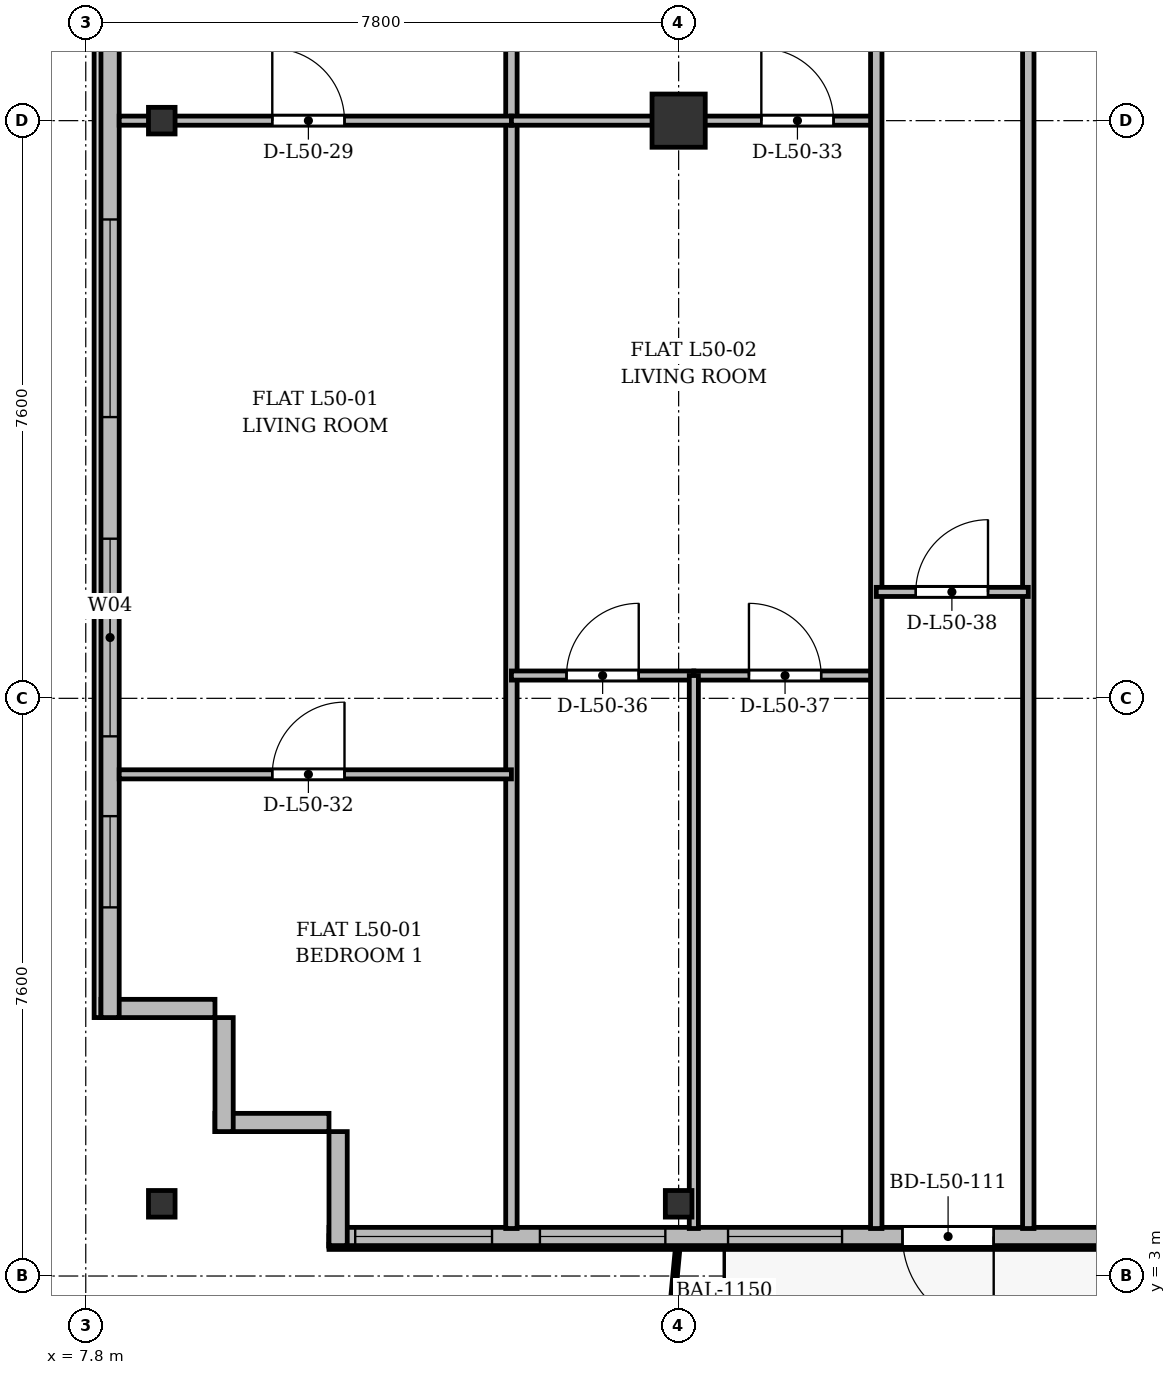
"""IFC4 building model, lengths in metres.
Left out: names, types, materials, properties, quantities, classifications, styles, units other than length and angle.
Written with IfcOpenShell. Run it as: python <this file> out.ifc"""

import sys

from ifc_helpers import new_model, si_unit, direction, frame, frame_2d, origin, origin_2d, place, context, subcontext, project, spatial, rectangle, i_section, extrude, source, transform, mapped, element, fill, save


model = new_model("IFC4")
c1 = context("Model", 3, precision=1e-05, world=origin(), true_north=direction((0.0, 1.0)))
c2 = subcontext(c1, "Body", "Model", "MODEL_VIEW")
j1 = project(units=[si_unit("LENGTHUNIT", "METRE"), si_unit("PLANEANGLEUNIT", "RADIAN")], contexts=[c1])
p1 = place(None, origin())
s1 = spatial("IfcSite", under=j1, at=p1, CompositionType="ELEMENT")
p2 = place(p1, origin())
s2 = spatial("IfcBuilding", under=s1, at=p2, CompositionType="ELEMENT")
p3 = place(p2, frame((0.0, 0.0, 194.1)))
s3 = spatial("IfcBuildingStorey", under=s2, at=p3, CompositionType="ELEMENT", Elevation=194.1)
m1 = source(origin(), c2, "Body", "SweptSolid", [
    extrude(i_section(OverallWidth=0.35, OverallDepth=0.35, WebThickness=0.018, FlangeThickness=0.028, at=origin_2d()), origin(), (0.0, 0.0, 1.0), 3.6),
])
for number, where, z_axis, x_axis in (
    (1, (8.8, 3.95, 0.0), (0.0, 0.0, 1.0), (1.0, 0.0, 0.0)),
    (2, (8.8, 18.2, 0.0), (0.0, 0.0, 1.0), (1.0, 0.0, 0.0)),
    (3, (15.6, 3.95, 0.0), (0.0, 0.0, 1.0), (1.0, 0.0, 0.0)),
):
    element("IfcColumn", number, at=place(p3, frame(where, z_axis=z_axis, x_axis=x_axis)), inside=s3, PredefinedType="COLUMN", context=c2, shape_type="MappedRepresentation", body=[
        mapped(m1, transform((0.0, 0.0, 0.0), x_axis=(1.0, 0.0, 0.0), y_axis=(0.0, 1.0, 0.0), z_axis=(0.0, 0.0, 1.0), scale=1.0)),
    ])
m2 = source(origin(), c2, "Body", "SweptSolid", [
    extrude(rectangle(XDim=0.7, YDim=0.7, at=origin_2d()), origin(), (0.0, 0.0, 1.0), 3.6),
])
p4 = place(p3, frame((15.6, 18.2, 0.0), z_axis=(0.0, 0.0, 1.0), x_axis=(1.0, 0.0, 0.0)))
e4 = element("IfcColumn", 4, at=p4, inside=s3, PredefinedType="COLUMN", context=c2, shape_type="MappedRepresentation", body=[
    mapped(m2, transform((0.0, 0.0, 0.0), x_axis=(1.0, 0.0, 0.0), y_axis=(0.0, 1.0, 0.0), z_axis=(0.0, 0.0, 1.0), scale=1.0)),
])
for number, where, z_axis, x_axis in (
    (5, (11.0, 5.02, 0.0), (0.0, 0.0, 1.0), (-1.0, 0.0, 0.0)),
    (6, (9.62, 4.9, 0.0), (0.0, 0.0, 1.0), (0.0, 1.0, 0.0)),
):
    element("IfcWall", number, at=place(p3, frame(where, z_axis=z_axis, x_axis=x_axis)), inside=s3, PredefinedType="SOLIDWALL", context=c2, shape_type="SweptSolid", body=[
        extrude(rectangle(XDim=1.5, YDim=0.24, at=frame_2d((0.75, 0.0))), origin(), (0.0, 0.0, 1.0), 3.36),
    ])
p5 = place(p3, frame((9.5, 6.52, 0.0), z_axis=(0.0, 0.0, 1.0), x_axis=(-1.0, 0.0, 0.0)))
e7 = element("IfcWall", 7, at=p5, inside=s3, PredefinedType="SOLIDWALL", context=c2, shape_type="SweptSolid", body=[
    extrude(rectangle(XDim=1.5, YDim=0.24, at=frame_2d((0.75, 0.0))), origin(), (0.0, 0.0, 1.0), 2.86),
])
p6 = place(p3, frame((8.12, 6.4, 0.0), z_axis=(0.0, 0.0, 1.0), x_axis=(0.0, 1.0, 0.0)))
e8 = element("IfcWall", 8, at=p6, inside=s3, PredefinedType="SOLIDWALL", context=c2, shape_type="SweptSolid", body=[
    extrude(rectangle(XDim=39.1, YDim=0.24, at=frame_2d((19.55, 0.0))), origin(), (0.0, 0.0, 1.0), 3.36),
])
p7 = place(p6, frame((1.45, 0.0, 0.92)))
e9 = element("IfcOpeningElement", 9, at=p7, cuts=e8, PredefinedType="OPENING", context=c2, shape_type="SweptSolid", body=[
    extrude(rectangle(XDim=1.2, YDim=1.65, at=frame_2d((0.6, 0.825))), frame((0.0, 0.13, 0.0), z_axis=(0.0, -1.0, 0.0), x_axis=(1.0, 0.0, 0.0)), (0.0, 0.0, 1.0), 0.26),
])
p8 = place(p6, frame((3.7, 0.0, 0.92)))
e10 = element("IfcOpeningElement", 10, at=p8, cuts=e8, PredefinedType="OPENING", context=c2, shape_type="SweptSolid", body=[
    extrude(rectangle(XDim=2.6, YDim=1.9, at=frame_2d((1.3, 0.95))), frame((0.0, 0.13, 0.0), z_axis=(0.0, -1.0, 0.0), x_axis=(1.0, 0.0, 0.0)), (0.0, 0.0, 1.0), 0.26),
])
p9 = place(p6, frame((7.9, 0.0, 0.92)))
e11 = element("IfcOpeningElement", 11, at=p9, cuts=e8, PredefinedType="OPENING", context=c2, shape_type="SweptSolid", body=[
    extrude(rectangle(XDim=2.6, YDim=1.9, at=frame_2d((1.3, 0.95))), frame((0.0, 0.13, 0.0), z_axis=(0.0, -1.0, 0.0), x_axis=(1.0, 0.0, 0.0)), (0.0, 0.0, 1.0), 0.26),
])
p10 = place(p6, frame((15.1, 0.0, 0.92)))
e12 = element("IfcOpeningElement", 12, at=p10, cuts=e8, PredefinedType="OPENING", context=c2, shape_type="SweptSolid", body=[
    extrude(rectangle(XDim=2.6, YDim=1.9, at=frame_2d((1.3, 0.95))), frame((0.0, 0.13, 0.0), z_axis=(0.0, -1.0, 0.0), x_axis=(1.0, 0.0, 0.0)), (0.0, 0.0, 1.0), 0.26),
])
p11 = place(p6, frame((33.4, 0.0, 0.92)))
e13 = element("IfcOpeningElement", 13, at=p11, cuts=e8, PredefinedType="OPENING", context=c2, shape_type="SweptSolid", body=[
    extrude(rectangle(XDim=1.2, YDim=1.65, at=frame_2d((0.6, 0.825))), frame((0.0, 0.13, 0.0), z_axis=(0.0, -1.0, 0.0), x_axis=(1.0, 0.0, 0.0)), (0.0, 0.0, 1.0), 0.26),
])
p12 = place(p6, frame((36.75, 0.0, 0.92)))
e14 = element("IfcOpeningElement", 14, at=p12, cuts=e8, PredefinedType="OPENING", context=c2, shape_type="SweptSolid", body=[
    extrude(rectangle(XDim=1.2, YDim=1.65, at=frame_2d((0.6, 0.825))), frame((0.0, 0.13, 0.0), z_axis=(0.0, -1.0, 0.0), x_axis=(1.0, 0.0, 0.0)), (0.0, 0.0, 1.0), 0.26),
])
p13 = place(p3, frame((30.6, 3.52, 0.0), z_axis=(0.0, 0.0, 1.0), x_axis=(-1.0, 0.0, 0.0)))
e15 = element("IfcWall", 15, at=p13, inside=s3, PredefinedType="SOLIDWALL", context=c2, shape_type="SweptSolid", body=[
    extrude(rectangle(XDim=19.6, YDim=0.24, at=frame_2d((9.8, 0.0))), origin(), (0.0, 0.0, 1.0), 3.36),
])
p14 = place(p13, frame((1.745, 0.0, 0.9)))
e16 = element("IfcOpeningElement", 16, at=p14, cuts=e15, PredefinedType="OPENING", context=c2, shape_type="SweptSolid", body=[
    extrude(rectangle(XDim=1.8, YDim=1.8, at=frame_2d((0.9, 0.9))), frame((0.0, 0.13, 0.0), z_axis=(0.0, -1.0, 0.0), x_axis=(1.0, 0.0, 0.0)), (0.0, 0.0, 1.0), 0.26),
])
p15 = place(p13, frame((6.7, 0.0, 0.9)))
e17 = element("IfcOpeningElement", 17, at=p15, cuts=e15, PredefinedType="OPENING", context=c2, shape_type="SweptSolid", body=[
    extrude(rectangle(XDim=2.2, YDim=1.8, at=frame_2d((1.1, 0.9))), frame((0.0, 0.13, 0.0), z_axis=(0.0, -1.0, 0.0), x_axis=(1.0, 0.0, 0.0)), (0.0, 0.0, 1.0), 0.26),
])
p16 = place(p13, frame((10.855, 0.0, 0.0)))
e18 = element("IfcOpeningElement", 18, at=p16, cuts=e15, PredefinedType="OPENING", context=c2, shape_type="SweptSolid", body=[
    extrude(rectangle(XDim=1.2, YDim=2.2, at=frame_2d((0.6, 1.1))), frame((0.0, 0.13, 0.0), z_axis=(0.0, -1.0, 0.0), x_axis=(1.0, 0.0, 0.0)), (0.0, 0.0, 1.0), 0.26),
])
p17 = place(p13, frame((12.85, 0.0, 0.9)))
e19 = element("IfcOpeningElement", 19, at=p17, cuts=e15, PredefinedType="OPENING", context=c2, shape_type="SweptSolid", body=[
    extrude(rectangle(XDim=1.5, YDim=1.75, at=frame_2d((0.75, 0.875))), frame((0.0, 0.13, 0.0), z_axis=(0.0, -1.0, 0.0), x_axis=(1.0, 0.0, 0.0)), (0.0, 0.0, 1.0), 0.26),
])
p18 = place(p13, frame((15.175, 0.0, 0.9)))
e20 = element("IfcOpeningElement", 20, at=p18, cuts=e15, PredefinedType="OPENING", context=c2, shape_type="SweptSolid", body=[
    extrude(rectangle(XDim=1.65, YDim=1.85, at=frame_2d((0.825, 0.925))), frame((0.0, 0.13, 0.0), z_axis=(0.0, -1.0, 0.0), x_axis=(1.0, 0.0, 0.0)), (0.0, 0.0, 1.0), 0.26),
])
p19 = place(p13, frame((17.455, 0.0, 0.9)))
e21 = element("IfcOpeningElement", 21, at=p19, cuts=e15, PredefinedType="OPENING", context=c2, shape_type="SweptSolid", body=[
    extrude(rectangle(XDim=1.8, YDim=1.8, at=frame_2d((0.9, 0.9))), frame((0.0, 0.13, 0.0), z_axis=(0.0, -1.0, 0.0), x_axis=(1.0, 0.0, 0.0)), (0.0, 0.0, 1.0), 0.26),
])
p20 = place(p3, frame((11.12, 3.4, 0.0), z_axis=(0.0, 0.0, 1.0), x_axis=(0.0, 1.0, 0.0)))
e22 = element("IfcWall", 22, at=p20, inside=s3, PredefinedType="SOLIDWALL", context=c2, shape_type="SweptSolid", body=[
    extrude(rectangle(XDim=1.5, YDim=0.24, at=frame_2d((0.75, 0.0))), origin(), (0.0, 0.0, 1.0), 2.91),
])
p21 = place(p3, frame((13.4, 3.625, 0.0), z_axis=(0.0, 0.0, 1.0), x_axis=(0.0, 1.0, 0.0)))
e23 = element("IfcWall", 23, at=p21, inside=s3, PredefinedType="PARTITIONING", context=c2, shape_type="SweptSolid", body=[
    extrude(rectangle(XDim=27.175, YDim=0.15, at=frame_2d((13.587, 0.0))), origin(), (0.0, 0.0, 1.0), 2.91),
])
p22 = place(p3, frame((8.24, 18.2, 0.0), z_axis=(0.0, 0.0, 1.0), x_axis=(1.0, 0.0, 0.0)))
e24 = element("IfcWall", 24, at=p22, inside=s3, PredefinedType="PARTITIONING", context=c2, shape_type="SweptSolid", body=[
    extrude(rectangle(XDim=5.16, YDim=0.12, at=frame_2d((2.58, 0.0))), origin(), (0.0, 0.0, 1.0), 2.91),
])
p23 = place(p22, frame((2.014, 0.0, 0.0)))
e25 = element("IfcOpeningElement", 25, at=p23, cuts=e24, PredefinedType="OPENING", context=c2, shape_type="SweptSolid", body=[
    extrude(rectangle(XDim=0.95, YDim=2.15, at=frame_2d((0.475, 1.075))), frame((0.0, 0.07, 0.0), z_axis=(0.0, -1.0, 0.0), x_axis=(1.0, 0.0, 0.0)), (0.0, 0.0, 1.0), 0.14),
])
p24 = place(p3, frame((8.24, 9.6, 0.0), z_axis=(0.0, 0.0, 1.0), x_axis=(1.0, 0.0, 0.0)))
e26 = element("IfcWall", 26, at=p24, inside=s3, PredefinedType="PARTITIONING", context=c2, shape_type="SweptSolid", body=[
    extrude(rectangle(XDim=5.16, YDim=0.12, at=frame_2d((2.58, 0.0))), origin(), (0.0, 0.0, 1.0), 2.86),
])
p25 = place(p24, frame((2.014, 0.0, 0.0)))
e27 = element("IfcOpeningElement", 27, at=p25, cuts=e26, PredefinedType="OPENING", context=c2, shape_type="SweptSolid", body=[
    extrude(rectangle(XDim=0.95, YDim=2.15, at=frame_2d((0.475, 1.075))), frame((0.0, 0.07, 0.0), z_axis=(0.0, -1.0, 0.0), x_axis=(1.0, 0.0, 0.0)), (0.0, 0.0, 1.0), 0.14),
])
p26 = place(p3, frame((13.4, 18.2, 0.0), z_axis=(0.0, 0.0, 1.0), x_axis=(1.0, 0.0, 0.0)))
e28 = element("IfcWall", 28, at=p26, inside=s3, PredefinedType="PARTITIONING", context=c2, shape_type="SweptSolid", body=[
    extrude(rectangle(XDim=4.8, YDim=0.12, at=frame_2d((2.4, 0.0))), origin(), (0.0, 0.0, 1.0), 2.91),
])
p27 = place(p26, frame((3.288, 0.0, 0.0)))
e29 = element("IfcOpeningElement", 29, at=p27, cuts=e28, PredefinedType="OPENING", context=c2, shape_type="SweptSolid", body=[
    extrude(rectangle(XDim=0.95, YDim=2.15, at=frame_2d((0.475, 1.075))), frame((0.0, 0.07, 0.0), z_axis=(0.0, -1.0, 0.0), x_axis=(1.0, 0.0, 0.0)), (0.0, 0.0, 1.0), 0.14),
])
p28 = place(p3, frame((13.4, 10.9, 0.0), z_axis=(0.0, 0.0, 1.0), x_axis=(1.0, 0.0, 0.0)))
e30 = element("IfcWall", 30, at=p28, inside=s3, PredefinedType="PARTITIONING", context=c2, shape_type="SweptSolid", body=[
    extrude(rectangle(XDim=2.4, YDim=0.12, at=frame_2d((1.2, 0.0))), origin(), (0.0, 0.0, 1.0), 2.86),
])
p29 = place(p28, frame((0.725, 0.0, 0.0)))
e31 = element("IfcOpeningElement", 31, at=p29, cuts=e30, PredefinedType="OPENING", context=c2, shape_type="SweptSolid", body=[
    extrude(rectangle(XDim=0.95, YDim=2.15, at=frame_2d((0.475, 1.075))), frame((0.0, 0.07, 0.0), z_axis=(0.0, -1.0, 0.0), x_axis=(1.0, 0.0, 0.0)), (0.0, 0.0, 1.0), 0.14),
])
p30 = place(p3, frame((15.8, 10.9, 0.0), z_axis=(0.0, 0.0, 1.0), x_axis=(1.0, 0.0, 0.0)))
e32 = element("IfcWall", 32, at=p30, inside=s3, PredefinedType="PARTITIONING", context=c2, shape_type="SweptSolid", body=[
    extrude(rectangle(XDim=2.4, YDim=0.12, at=frame_2d((1.2, 0.0))), origin(), (0.0, 0.0, 1.0), 3.36),
])
p31 = place(p30, frame((0.725, 0.0, 0.0)))
e33 = element("IfcOpeningElement", 33, at=p31, cuts=e32, PredefinedType="OPENING", context=c2, shape_type="SweptSolid", body=[
    extrude(rectangle(XDim=0.95, YDim=2.15, at=frame_2d((0.475, 1.075))), frame((0.0, 0.07, 0.0), z_axis=(0.0, -1.0, 0.0), x_axis=(1.0, 0.0, 0.0)), (0.0, 0.0, 1.0), 0.14),
])
p32 = place(p3, frame((15.8, 3.625, 0.0), z_axis=(0.0, 0.0, 1.0), x_axis=(0.0, 1.0, 0.0)))
e34 = element("IfcWall", 34, at=p32, inside=s3, PredefinedType="PARTITIONING", context=c2, shape_type="SweptSolid", body=[
    extrude(rectangle(XDim=7.275, YDim=0.12, at=frame_2d((3.637, 0.0))), origin(), (0.0, 0.0, 1.0), 2.91),
])
for number, where, z_axis, x_axis in (
    (35, (18.2, 3.625, 0.0), (0.0, 0.0, 1.0), (0.0, 1.0, 0.0)),
    (36, (20.2, 3.625, 0.0), (0.0, 0.0, 1.0), (0.0, 1.0, 0.0)),
):
    element("IfcWall", number, at=place(p3, frame(where, z_axis=z_axis, x_axis=x_axis)), inside=s3, PredefinedType="PARTITIONING", context=c2, shape_type="SweptSolid", body=[
        extrude(rectangle(XDim=27.175, YDim=0.15, at=frame_2d((13.587, 0.0))), origin(), (0.0, 0.0, 1.0), 2.91),
    ])
p33 = place(p3, frame((18.2, 12.0, 0.0), z_axis=(0.0, 0.0, 1.0), x_axis=(1.0, 0.0, 0.0)))
e37 = element("IfcWall", 37, at=p33, inside=s3, PredefinedType="PARTITIONING", context=c2, shape_type="SweptSolid", body=[
    extrude(rectangle(XDim=2.0, YDim=0.12, at=frame_2d((1.0, 0.0))), origin(), (0.0, 0.0, 1.0), 3.36),
])
p34 = place(p33, frame((0.52, 0.0, 0.0)))
e38 = element("IfcOpeningElement", 38, at=p34, cuts=e37, PredefinedType="OPENING", context=c2, shape_type="SweptSolid", body=[
    extrude(rectangle(XDim=0.95, YDim=2.15, at=frame_2d((0.475, 1.075))), frame((0.0, 0.07, 0.0), z_axis=(0.0, -1.0, 0.0), x_axis=(1.0, 0.0, 0.0)), (0.0, 0.0, 1.0), 0.14),
])
m3 = source(origin(), c2, "Body", "SweptSolid", [
    extrude(rectangle(XDim=1.2, YDim=1.65, at=frame_2d((0.6, 0.825))), frame((0.0, 0.03, 0.0), z_axis=(0.0, -1.0, 0.0), x_axis=(1.0, 0.0, 0.0)), (0.0, 0.0, 1.0), 0.06),
])
p35 = place(p7, origin())
e39 = element("IfcWindow", 39, at=p35, inside=s3, PartitioningType="SINGLE_PANEL", PredefinedType="WINDOW", context=c2, shape_type="MappedRepresentation", body=[
    mapped(m3, transform((0.0, 0.0, 0.0), x_axis=(1.0, 0.0, 0.0), y_axis=(0.0, 1.0, 0.0), z_axis=(0.0, 0.0, 1.0), scale=1.0)),
])
fill(e9, e39)
m4 = source(origin(), c2, "Body", "SweptSolid", [
    extrude(rectangle(XDim=2.6, YDim=1.9, at=frame_2d((1.3, 0.95))), frame((0.0, 0.03, 0.0), z_axis=(0.0, -1.0, 0.0), x_axis=(1.0, 0.0, 0.0)), (0.0, 0.0, 1.0), 0.06),
])
p36 = place(p8, origin())
e40 = element("IfcWindow", 40, at=p36, inside=s3, PartitioningType="SINGLE_PANEL", PredefinedType="WINDOW", context=c2, shape_type="MappedRepresentation", body=[
    mapped(m4, transform((0.0, 0.0, 0.0), x_axis=(1.0, 0.0, 0.0), y_axis=(0.0, 1.0, 0.0), z_axis=(0.0, 0.0, 1.0), scale=1.0)),
])
fill(e10, e40)
p37 = place(p9, origin())
e41 = element("IfcWindow", 41, at=p37, inside=s3, PartitioningType="SINGLE_PANEL", PredefinedType="WINDOW", context=c2, shape_type="MappedRepresentation", body=[
    mapped(m4, transform((0.0, 0.0, 0.0), x_axis=(1.0, 0.0, 0.0), y_axis=(0.0, 1.0, 0.0), z_axis=(0.0, 0.0, 1.0), scale=1.0)),
])
fill(e11, e41)
m5 = source(origin(), c2, "Body", "SweptSolid", [
    extrude(rectangle(XDim=1.2, YDim=2.2, at=frame_2d((0.6, 1.1))), frame((0.0, 0.025, 0.0), z_axis=(0.0, -1.0, 0.0), x_axis=(1.0, 0.0, 0.0)), (0.0, 0.0, 1.0), 0.05),
])
p38 = place(p16, origin())
e42 = element("IfcDoor", 42, at=p38, inside=s3, OperationType="SINGLE_SWING_LEFT", PredefinedType="DOOR", context=c2, shape_type="MappedRepresentation", body=[
    mapped(m5, transform((0.0, 0.0, 0.0), x_axis=(1.0, 0.0, 0.0), y_axis=(0.0, 1.0, 0.0), z_axis=(0.0, 0.0, 1.0), scale=1.0)),
])
fill(e18, e42)
m6 = source(origin(), c2, "Body", "SweptSolid", [
    extrude(rectangle(XDim=1.5, YDim=1.75, at=frame_2d((0.75, 0.875))), frame((0.0, 0.03, 0.0), z_axis=(0.0, -1.0, 0.0), x_axis=(1.0, 0.0, 0.0)), (0.0, 0.0, 1.0), 0.06),
])
p39 = place(p17, origin())
e43 = element("IfcWindow", 43, at=p39, inside=s3, PartitioningType="SINGLE_PANEL", PredefinedType="WINDOW", context=c2, shape_type="MappedRepresentation", body=[
    mapped(m6, transform((0.0, 0.0, 0.0), x_axis=(1.0, 0.0, 0.0), y_axis=(0.0, 1.0, 0.0), z_axis=(0.0, 0.0, 1.0), scale=1.0)),
])
fill(e19, e43)
m7 = source(origin(), c2, "Body", "SweptSolid", [
    extrude(rectangle(XDim=1.65, YDim=1.85, at=frame_2d((0.825, 0.925))), frame((0.0, 0.03, 0.0), z_axis=(0.0, -1.0, 0.0), x_axis=(1.0, 0.0, 0.0)), (0.0, 0.0, 1.0), 0.06),
])
p40 = place(p18, origin())
e44 = element("IfcWindow", 44, at=p40, inside=s3, PartitioningType="SINGLE_PANEL", PredefinedType="WINDOW", context=c2, shape_type="MappedRepresentation", body=[
    mapped(m7, transform((0.0, 0.0, 0.0), x_axis=(1.0, 0.0, 0.0), y_axis=(0.0, 1.0, 0.0), z_axis=(0.0, 0.0, 1.0), scale=1.0)),
])
fill(e20, e44)
m8 = source(origin(), c2, "Body", "SweptSolid", [
    extrude(rectangle(XDim=1.8, YDim=1.8, at=frame_2d((0.9, 0.9))), frame((0.0, 0.03, 0.0), z_axis=(0.0, -1.0, 0.0), x_axis=(1.0, 0.0, 0.0)), (0.0, 0.0, 1.0), 0.06),
])
p41 = place(p19, origin())
e45 = element("IfcWindow", 45, at=p41, inside=s3, PartitioningType="SINGLE_PANEL", PredefinedType="WINDOW", context=c2, shape_type="MappedRepresentation", body=[
    mapped(m8, transform((0.0, 0.0, 0.0), x_axis=(1.0, 0.0, 0.0), y_axis=(0.0, 1.0, 0.0), z_axis=(0.0, 0.0, 1.0), scale=1.0)),
])
fill(e21, e45)
m9 = source(origin(), c2, "Body", "SweptSolid", [
    extrude(rectangle(XDim=0.95, YDim=2.15, at=frame_2d((0.475, 1.075))), frame((0.0, 0.025, 0.0), z_axis=(0.0, -1.0, 0.0), x_axis=(1.0, 0.0, 0.0)), (0.0, 0.0, 1.0), 0.05),
])
p42 = place(p23, origin())
e46 = element("IfcDoor", 46, at=p42, inside=s3, OperationType="SINGLE_SWING_LEFT", PredefinedType="DOOR", context=c2, shape_type="MappedRepresentation", body=[
    mapped(m9, transform((0.0, 0.0, 0.0), x_axis=(1.0, 0.0, 0.0), y_axis=(0.0, 1.0, 0.0), z_axis=(0.0, 0.0, 1.0), scale=1.0)),
])
fill(e25, e46)
p43 = place(p25, origin())
e47 = element("IfcDoor", 47, at=p43, inside=s3, OperationType="SINGLE_SWING_RIGHT", PredefinedType="DOOR", context=c2, shape_type="MappedRepresentation", body=[
    mapped(m9, transform((0.0, 0.0, 0.0), x_axis=(1.0, 0.0, 0.0), y_axis=(0.0, 1.0, 0.0), z_axis=(0.0, 0.0, 1.0), scale=1.0)),
])
fill(e27, e47)
p44 = place(p27, origin())
e48 = element("IfcDoor", 48, at=p44, inside=s3, OperationType="SINGLE_SWING_LEFT", PredefinedType="DOOR", context=c2, shape_type="MappedRepresentation", body=[
    mapped(m9, transform((0.0, 0.0, 0.0), x_axis=(1.0, 0.0, 0.0), y_axis=(0.0, 1.0, 0.0), z_axis=(0.0, 0.0, 1.0), scale=1.0)),
])
fill(e29, e48)
p45 = place(p29, origin())
e49 = element("IfcDoor", 49, at=p45, inside=s3, OperationType="SINGLE_SWING_RIGHT", PredefinedType="DOOR", context=c2, shape_type="MappedRepresentation", body=[
    mapped(m9, transform((0.0, 0.0, 0.0), x_axis=(1.0, 0.0, 0.0), y_axis=(0.0, 1.0, 0.0), z_axis=(0.0, 0.0, 1.0), scale=1.0)),
])
fill(e31, e49)
p46 = place(p31, origin())
e50 = element("IfcDoor", 50, at=p46, inside=s3, OperationType="SINGLE_SWING_LEFT", PredefinedType="DOOR", context=c2, shape_type="MappedRepresentation", body=[
    mapped(m9, transform((0.0, 0.0, 0.0), x_axis=(1.0, 0.0, 0.0), y_axis=(0.0, 1.0, 0.0), z_axis=(0.0, 0.0, 1.0), scale=1.0)),
])
fill(e33, e50)
p47 = place(p34, origin())
e51 = element("IfcDoor", 51, at=p47, inside=s3, OperationType="SINGLE_SWING_RIGHT", PredefinedType="DOOR", context=c2, shape_type="MappedRepresentation", body=[
    mapped(m9, transform((0.0, 0.0, 0.0), x_axis=(1.0, 0.0, 0.0), y_axis=(0.0, 1.0, 0.0), z_axis=(0.0, 0.0, 1.0), scale=1.0)),
])
fill(e38, e51)
save(model, sys.argv[1])
